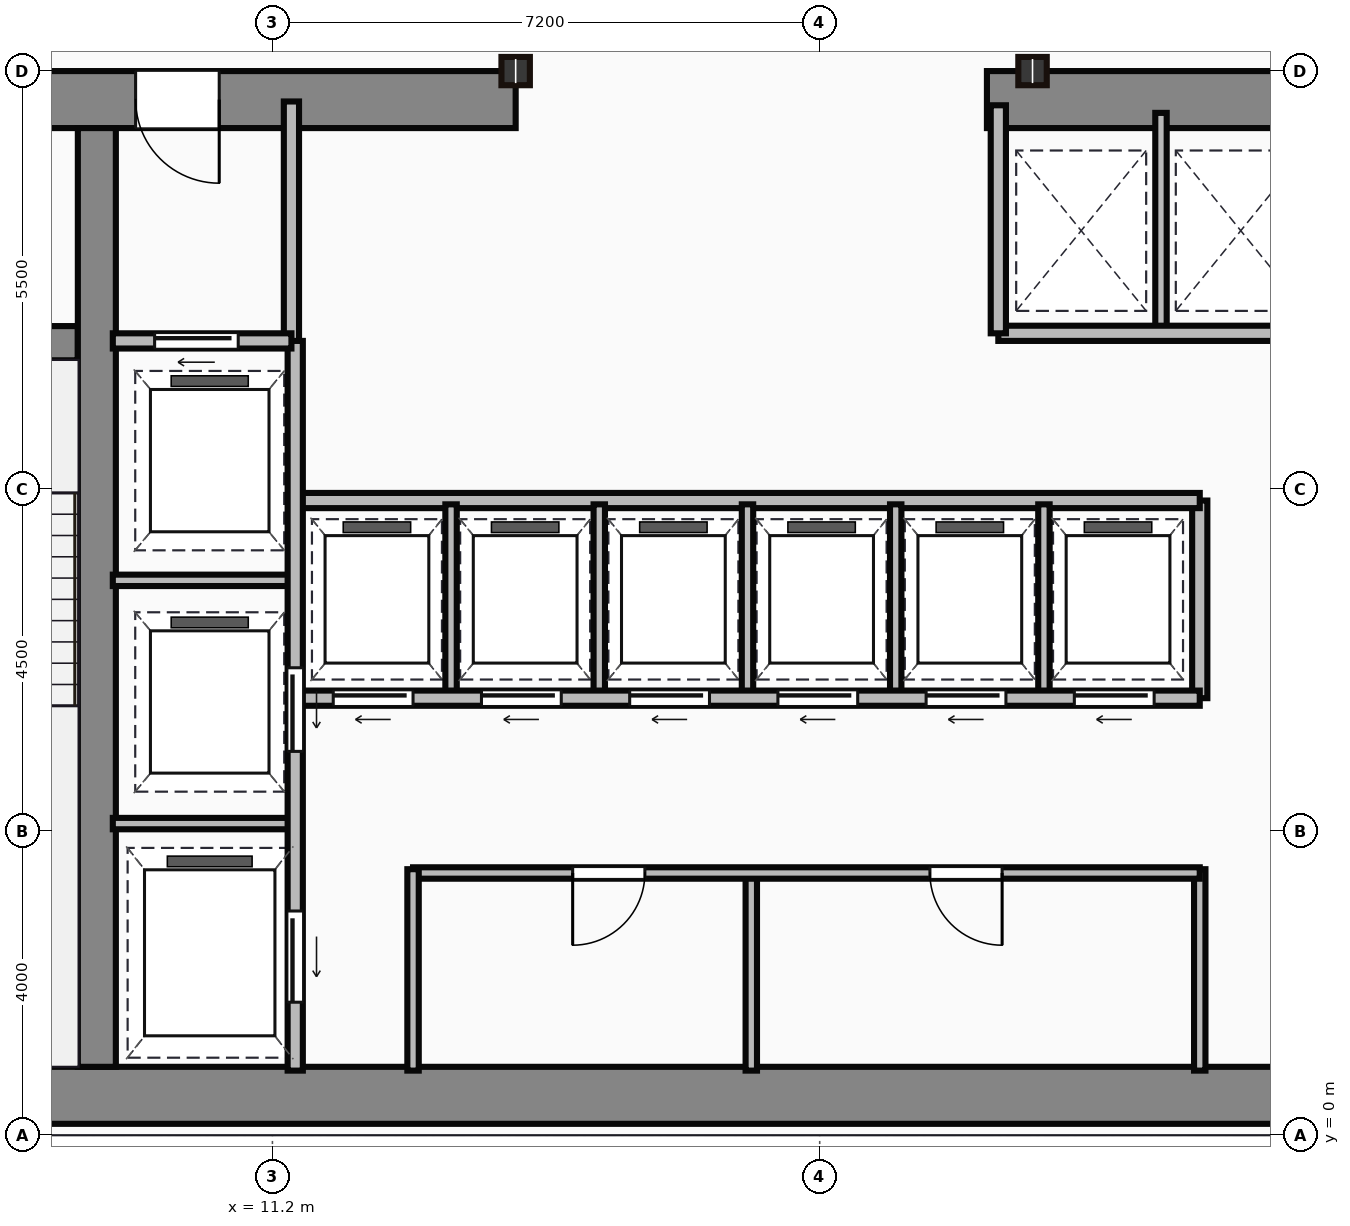
"""IFC4 building model, lengths in metres.
Left out: names, types, materials, properties, quantities, classifications, styles, units other than length and angle.
Written with IfcOpenShell. Run it as: python <this file> out.ifc"""

import sys

from ifc_helpers import new_model, si_unit, direction, frame, frame_2d, origin, origin_2d, place, context, subcontext, project, spatial, rectangle, i_section, extrude, source, transform, mapped, element, fill, save


model = new_model("IFC4")
c1 = context("Model", 3, precision=1e-05, world=origin(), true_north=direction((0.0, 1.0)))
c2 = subcontext(c1, "Body", "Model", "MODEL_VIEW")
j1 = project(units=[si_unit("LENGTHUNIT", "METRE"), si_unit("PLANEANGLEUNIT", "RADIAN")], contexts=[c1])
p1 = place(None, origin())
s1 = spatial("IfcSite", under=j1, at=p1, CompositionType="ELEMENT")
p2 = place(p1, origin())
s2 = spatial("IfcBuilding", under=s1, at=p2, CompositionType="ELEMENT")
p3 = place(p2, frame((0.0, 0.0, 173.45)))
s3 = spatial("IfcBuildingStorey", under=s2, at=p3, CompositionType="ELEMENT", Elevation=173.45)
m1 = source(origin(), c2, "Body", "SweptSolid", [
    extrude(rectangle(XDim=29.5, YDim=0.75, at=frame_2d((14.75, 0.0))), origin(), (0.0, 0.0, 1.0), 3.65),
])
p4 = place(p3, frame((4.5, 0.525, 0.0), z_axis=(0.0, 0.0, 1.0), x_axis=(1.0, 0.0, 0.0)))
e1 = element("IfcWall", 1, at=p4, inside=s3, PredefinedType="SHEAR", context=c2, shape_type="MappedRepresentation", body=[
    mapped(m1, transform((0.0, 0.0, 0.0))),
])
m2 = source(origin(), c2, "Body", "SweptSolid", [
    extrude(rectangle(XDim=9.1, YDim=0.75, at=frame_2d((4.55, 0.0))), origin(), (0.0, 0.0, 1.0), 3.65),
])
p5 = place(p3, frame((5.3, 13.625, 0.0), z_axis=(0.0, 0.0, 1.0), x_axis=(1.0, 0.0, 0.0)))
e2 = element("IfcWall", 2, at=p5, inside=s3, PredefinedType="SHEAR", context=c2, shape_type="MappedRepresentation", body=[
    mapped(m2, transform((0.0, 0.0, 0.0))),
])
p6 = place(p5, frame((4.1, 0.0, 0.0)))
e3 = element("IfcOpeningElement", 3, at=p6, cuts=e2, PredefinedType="OPENING", context=c2, shape_type="SweptSolid", body=[
    extrude(rectangle(XDim=1.1, YDim=2.15, at=frame_2d((0.55, 1.075))), frame((0.0, 0.385, 0.0), z_axis=(0.0, -1.0, 0.0), x_axis=(1.0, 0.0, 0.0)), (0.0, 0.0, 1.0), 0.77),
])
m3 = source(origin(), c2, "Body", "SweptSolid", [
    extrude(rectangle(XDim=12.6, YDim=0.75, at=frame_2d((6.3, 0.0))), origin(), (0.0, 0.0, 1.0), 3.65),
])
p7 = place(p3, frame((20.6, 13.625, 0.0), z_axis=(0.0, 0.0, 1.0), x_axis=(1.0, 0.0, 0.0)))
e4 = element("IfcWall", 4, at=p7, inside=s3, PredefinedType="SHEAR", context=c2, shape_type="MappedRepresentation", body=[
    mapped(m3, transform((0.0, 0.0, 0.0))),
])
p8 = place(p7, frame((9.25, 0.0, 0.0)))
e5 = element("IfcOpeningElement", 5, at=p8, cuts=e4, PredefinedType="OPENING", context=c2, shape_type="SweptSolid", body=[
    extrude(rectangle(XDim=1.1, YDim=2.15, at=frame_2d((0.55, 1.075))), frame((0.0, 0.385, 0.0), z_axis=(0.0, -1.0, 0.0), x_axis=(1.0, 0.0, 0.0)), (0.0, 0.0, 1.0), 0.77),
])
m4 = source(origin(), c2, "Body", "SweptSolid", [
    extrude(rectangle(XDim=12.35, YDim=0.5, at=frame_2d((6.175, 0.0))), origin(), (0.0, 0.0, 1.0), 3.65),
])
p9 = place(p3, frame((8.89, 0.9, 0.0), z_axis=(0.0, 0.0, 1.0), x_axis=(0.0, 1.0, 0.0)))
e6 = element("IfcWall", 6, at=p9, inside=s3, PredefinedType="SHEAR", context=c2, shape_type="MappedRepresentation", body=[
    mapped(m4, transform((0.0, 0.0, 0.0))),
])
m5 = source(origin(), c2, "Body", "SweptSolid", [
    extrude(rectangle(XDim=3.39, YDim=0.45, at=frame_2d((1.695, 0.0))), origin(), (0.0, 0.0, 1.0), 3.65),
])
p10 = place(p3, frame((5.25, 10.42, 0.0), z_axis=(0.0, 0.0, 1.0), x_axis=(1.0, 0.0, 0.0)))
e7 = element("IfcWall", 7, at=p10, inside=s3, PredefinedType="SHEAR", context=c2, shape_type="MappedRepresentation", body=[
    mapped(m5, transform((0.0, 0.0, 0.0))),
])
p11 = place(p10, frame((1.05, 0.0, 0.0)))
e8 = element("IfcOpeningElement", 8, at=p11, cuts=e7, PredefinedType="OPENING", context=c2, shape_type="SweptSolid", body=[
    extrude(rectangle(XDim=1.1, YDim=2.15, at=frame_2d((0.55, 1.075))), frame((0.0, 0.235, 0.0), z_axis=(0.0, -1.0, 0.0), x_axis=(1.0, 0.0, 0.0)), (0.0, 0.0, 1.0), 0.47),
])
m6 = source(origin(), c2, "Body", "SweptSolid", [
    extrude(i_section(OverallWidth=0.374, OverallDepth=0.372, WebThickness=0.016, FlangeThickness=0.026, at=origin_2d()), origin(), (0.0, 0.0, 1.0), 3.65),
])
for number, where, z_axis, x_axis in (
    (9, (14.4, 14.0, 0.0), (0.0, 0.0, 1.0), (1.0, 0.0, 0.0)),
    (10, (21.2, 14.0, 0.0), (0.0, 0.0, 1.0), (1.0, 0.0, 0.0)),
):
    element("IfcColumn", number, at=place(p3, frame(where, z_axis=z_axis, x_axis=x_axis)), inside=s3, PredefinedType="COLUMN", context=c2, shape_type="MappedRepresentation", body=[
        mapped(m6, transform((0.0, 0.0, 0.0))),
    ])
m7 = source(origin(), c2, "Body", "SweptSolid", [
    extrude(rectangle(XDim=3.18, YDim=0.2, at=frame_2d((1.59, 0.0))), origin(), (0.0, 0.0, 1.0), 3.4),
])
p12 = place(p3, frame((11.45, 10.42, 0.0), z_axis=(0.0, 0.0, 1.0), x_axis=(0.0, 1.0, 0.0)))
e11 = element("IfcWall", 11, at=p12, inside=s3, PredefinedType="PARTITIONING", context=c2, shape_type="MappedRepresentation", body=[
    mapped(m7, transform((0.0, 0.0, 0.0))),
])
m8 = source(origin(), c2, "Body", "SweptSolid", [
    extrude(rectangle(XDim=2.35, YDim=0.2, at=frame_2d((1.175, 0.0))), origin(), (0.0, 0.0, 1.0), 3.4),
])
p13 = place(p3, frame((9.1, 10.45, 0.0), z_axis=(0.0, 0.0, 1.0), x_axis=(1.0, 0.0, 0.0)))
e12 = element("IfcWall", 12, at=p13, inside=s3, PredefinedType="PARTITIONING", context=c2, shape_type="MappedRepresentation", body=[
    mapped(m8, transform((0.0, 0.0, 0.0))),
])
p14 = place(p13, frame((0.55, 0.0, 0.0)))
e13 = element("IfcOpeningElement", 13, at=p14, cuts=e12, PredefinedType="OPENING", context=c2, shape_type="SweptSolid", body=[
    extrude(rectangle(XDim=1.1, YDim=2.15, at=frame_2d((0.55, 1.075))), frame((0.0, 0.11, 0.0), z_axis=(0.0, -1.0, 0.0), x_axis=(1.0, 0.0, 0.0)), (0.0, 0.0, 1.0), 0.22),
])
m9 = source(origin(), c2, "Body", "SweptSolid", [
    extrude(rectangle(XDim=9.6, YDim=0.2, at=frame_2d((4.8, 0.0))), origin(), (0.0, 0.0, 1.0), 3.4),
])
p15 = place(p3, frame((11.5, 0.85, 0.0), z_axis=(0.0, 0.0, 1.0), x_axis=(0.0, 1.0, 0.0)))
e14 = element("IfcWall", 14, at=p15, inside=s3, PredefinedType="PARTITIONING", context=c2, shape_type="MappedRepresentation", body=[
    mapped(m9, transform((0.0, 0.0, 0.0))),
])
p16 = place(p15, frame((4.2, 0.0, 0.0)))
e15 = element("IfcOpeningElement", 15, at=p16, cuts=e14, PredefinedType="OPENING", context=c2, shape_type="SweptSolid", body=[
    extrude(rectangle(XDim=1.1, YDim=2.15, at=frame_2d((0.55, 1.075))), frame((0.0, 0.11, 0.0), z_axis=(0.0, -1.0, 0.0), x_axis=(1.0, 0.0, 0.0)), (0.0, 0.0, 1.0), 0.22),
])
p17 = place(p15, frame((0.9, 0.0, 0.0)))
e16 = element("IfcOpeningElement", 16, at=p17, cuts=e14, PredefinedType="OPENING", context=c2, shape_type="SweptSolid", body=[
    extrude(rectangle(XDim=1.2, YDim=2.15, at=frame_2d((0.6, 1.075))), frame((0.0, 0.11, 0.0), z_axis=(0.0, -1.0, 0.0), x_axis=(1.0, 0.0, 0.0)), (0.0, 0.0, 1.0), 0.22),
])
m10 = source(origin(), c2, "Body", "SweptSolid", [
    extrude(rectangle(XDim=2.4, YDim=0.15, at=frame_2d((1.2, 0.0))), origin(), (0.0, 0.0, 1.0), 3.4),
])
for number, where, z_axis, x_axis in (
    (17, (9.1, 4.1, 0.0), (0.0, 0.0, 1.0), (1.0, 0.0, 0.0)),
    (18, (9.1, 7.3, 0.0), (0.0, 0.0, 1.0), (1.0, 0.0, 0.0)),
):
    element("IfcWall", number, at=place(p3, frame(where, z_axis=z_axis, x_axis=x_axis)), inside=s3, PredefinedType="PARTITIONING", context=c2, shape_type="MappedRepresentation", body=[
        mapped(m10, transform((0.0, 0.0, 0.0))),
    ])
m11 = source(origin(), c2, "Body", "SweptSolid", [
    extrude(rectangle(XDim=2.65, YDim=0.15, at=frame_2d((1.325, 0.0))), origin(), (0.0, 0.0, 1.0), 3.4),
])
p18 = place(p3, frame((13.05, 0.85, 0.0), z_axis=(0.0, 0.0, 1.0), x_axis=(0.0, 1.0, 0.0)))
e19 = element("IfcWall", 19, at=p18, inside=s3, PredefinedType="PARTITIONING", context=c2, shape_type="MappedRepresentation", body=[
    mapped(m11, transform((0.0, 0.0, 0.0))),
])
m12 = source(origin(), c2, "Body", "SweptSolid", [
    extrude(rectangle(XDim=10.35, YDim=0.15, at=frame_2d((5.175, 0.0))), origin(), (0.0, 0.0, 1.0), 3.4),
])
p19 = place(p3, frame((13.05, 3.45, 0.0), z_axis=(0.0, 0.0, 1.0), x_axis=(1.0, 0.0, 0.0)))
e20 = element("IfcWall", 20, at=p19, inside=s3, PredefinedType="PARTITIONING", context=c2, shape_type="MappedRepresentation", body=[
    mapped(m12, transform((0.0, 0.0, 0.0))),
])
p20 = place(p19, frame((2.1, 0.0, 0.0)))
e21 = element("IfcOpeningElement", 21, at=p20, cuts=e20, PredefinedType="OPENING", context=c2, shape_type="SweptSolid", body=[
    extrude(rectangle(XDim=0.95, YDim=2.15, at=frame_2d((0.475, 1.075))), frame((0.0, 0.085, 0.0), z_axis=(0.0, -1.0, 0.0), x_axis=(1.0, 0.0, 0.0)), (0.0, 0.0, 1.0), 0.17),
])
p21 = place(p19, frame((6.8, 0.0, 0.0)))
e22 = element("IfcOpeningElement", 22, at=p21, cuts=e20, PredefinedType="OPENING", context=c2, shape_type="SweptSolid", body=[
    extrude(rectangle(XDim=0.95, YDim=2.15, at=frame_2d((0.475, 1.075))), frame((0.0, 0.085, 0.0), z_axis=(0.0, -1.0, 0.0), x_axis=(1.0, 0.0, 0.0)), (0.0, 0.0, 1.0), 0.17),
])
p22 = place(p3, frame((23.4, 0.85, 0.0), z_axis=(0.0, 0.0, 1.0), x_axis=(0.0, 1.0, 0.0)))
e23 = element("IfcWall", 23, at=p22, inside=s3, PredefinedType="PARTITIONING", context=c2, shape_type="MappedRepresentation", body=[
    mapped(m11, transform((0.0, 0.0, 0.0))),
])
m13 = source(origin(), c2, "Body", "SweptSolid", [
    extrude(rectangle(XDim=2.6, YDim=0.15, at=frame_2d((1.3, 0.0))), origin(), (0.0, 0.0, 1.0), 3.4),
])
p23 = place(p3, frame((17.5, 0.85, 0.0), z_axis=(0.0, 0.0, 1.0), x_axis=(0.0, 1.0, 0.0)))
e24 = element("IfcWall", 24, at=p23, inside=s3, PredefinedType="PARTITIONING", context=c2, shape_type="MappedRepresentation", body=[
    mapped(m13, transform((0.0, 0.0, 0.0))),
])
m14 = source(origin(), c2, "Body", "SweptSolid", [
    extrude(rectangle(XDim=11.85, YDim=0.2, at=frame_2d((5.925, 0.0))), origin(), (0.0, 0.0, 1.0), 3.4),
])
p24 = place(p3, frame((11.55, 5.75, 0.0), z_axis=(0.0, 0.0, 1.0), x_axis=(1.0, 0.0, 0.0)))
e25 = element("IfcWall", 25, at=p24, inside=s3, PredefinedType="PARTITIONING", context=c2, shape_type="MappedRepresentation", body=[
    mapped(m14, transform((0.0, 0.0, 0.0))),
])
p25 = place(p24, frame((0.45, 0.0, 0.0)))
e26 = element("IfcOpeningElement", 26, at=p25, cuts=e25, PredefinedType="OPENING", context=c2, shape_type="SweptSolid", body=[
    extrude(rectangle(XDim=1.05, YDim=2.15, at=frame_2d((0.525, 1.075))), frame((0.0, 0.11, 0.0), z_axis=(0.0, -1.0, 0.0), x_axis=(1.0, 0.0, 0.0)), (0.0, 0.0, 1.0), 0.22),
])
p26 = place(p24, frame((2.4, 0.0, 0.0)))
e27 = element("IfcOpeningElement", 27, at=p26, cuts=e25, PredefinedType="OPENING", context=c2, shape_type="SweptSolid", body=[
    extrude(rectangle(XDim=1.05, YDim=2.15, at=frame_2d((0.525, 1.075))), frame((0.0, 0.11, 0.0), z_axis=(0.0, -1.0, 0.0), x_axis=(1.0, 0.0, 0.0)), (0.0, 0.0, 1.0), 0.22),
])
p27 = place(p24, frame((4.35, 0.0, 0.0)))
e28 = element("IfcOpeningElement", 28, at=p27, cuts=e25, PredefinedType="OPENING", context=c2, shape_type="SweptSolid", body=[
    extrude(rectangle(XDim=1.05, YDim=2.15, at=frame_2d((0.525, 1.075))), frame((0.0, 0.11, 0.0), z_axis=(0.0, -1.0, 0.0), x_axis=(1.0, 0.0, 0.0)), (0.0, 0.0, 1.0), 0.22),
])
p28 = place(p24, frame((6.3, 0.0, 0.0)))
e29 = element("IfcOpeningElement", 29, at=p28, cuts=e25, PredefinedType="OPENING", context=c2, shape_type="SweptSolid", body=[
    extrude(rectangle(XDim=1.05, YDim=2.15, at=frame_2d((0.525, 1.075))), frame((0.0, 0.11, 0.0), z_axis=(0.0, -1.0, 0.0), x_axis=(1.0, 0.0, 0.0)), (0.0, 0.0, 1.0), 0.22),
])
p29 = place(p24, frame((8.25, 0.0, 0.0)))
e30 = element("IfcOpeningElement", 30, at=p29, cuts=e25, PredefinedType="OPENING", context=c2, shape_type="SweptSolid", body=[
    extrude(rectangle(XDim=1.05, YDim=2.15, at=frame_2d((0.525, 1.075))), frame((0.0, 0.11, 0.0), z_axis=(0.0, -1.0, 0.0), x_axis=(1.0, 0.0, 0.0)), (0.0, 0.0, 1.0), 0.22),
])
p30 = place(p24, frame((10.2, 0.0, 0.0)))
e31 = element("IfcOpeningElement", 31, at=p30, cuts=e25, PredefinedType="OPENING", context=c2, shape_type="SweptSolid", body=[
    extrude(rectangle(XDim=1.05, YDim=2.15, at=frame_2d((0.525, 1.075))), frame((0.0, 0.11, 0.0), z_axis=(0.0, -1.0, 0.0), x_axis=(1.0, 0.0, 0.0)), (0.0, 0.0, 1.0), 0.22),
])
p31 = place(p3, frame((11.55, 8.35, 0.0), z_axis=(0.0, 0.0, 1.0), x_axis=(1.0, 0.0, 0.0)))
e32 = element("IfcWall", 32, at=p31, inside=s3, PredefinedType="PARTITIONING", context=c2, shape_type="MappedRepresentation", body=[
    mapped(m14, transform((0.0, 0.0, 0.0))),
])
m15 = source(origin(), c2, "Body", "SweptSolid", [
    extrude(rectangle(XDim=2.6, YDim=0.2, at=frame_2d((1.3, 0.0))), origin(), (0.0, 0.0, 1.0), 3.4),
])
p32 = place(p3, frame((23.4, 5.75, 0.0), z_axis=(0.0, 0.0, 1.0), x_axis=(0.0, 1.0, 0.0)))
e33 = element("IfcWall", 33, at=p32, inside=s3, PredefinedType="PARTITIONING", context=c2, shape_type="MappedRepresentation", body=[
    mapped(m15, transform((0.0, 0.0, 0.0))),
])
m16 = source(origin(), c2, "Body", "SweptSolid", [
    extrude(rectangle(XDim=2.5, YDim=0.15, at=frame_2d((1.25, 0.0))), origin(), (0.0, 0.0, 1.0), 3.4),
])
for number, where, z_axis, x_axis in (
    (34, (13.55, 5.8, 0.0), (0.0, 0.0, 1.0), (0.0, 1.0, 0.0)),
    (35, (15.5, 5.8, 0.0), (0.0, 0.0, 1.0), (0.0, 1.0, 0.0)),
    (36, (17.45, 5.8, 0.0), (0.0, 0.0, 1.0), (0.0, 1.0, 0.0)),
    (37, (19.4, 5.8, 0.0), (0.0, 0.0, 1.0), (0.0, 1.0, 0.0)),
    (38, (21.35, 5.8, 0.0), (0.0, 0.0, 1.0), (0.0, 1.0, 0.0)),
):
    element("IfcWall", number, at=place(p3, frame(where, z_axis=z_axis, x_axis=x_axis)), inside=s3, PredefinedType="PARTITIONING", context=c2, shape_type="MappedRepresentation", body=[
        mapped(m16, transform((0.0, 0.0, 0.0))),
    ])
m17 = source(origin(), c2, "Body", "SweptSolid", [
    extrude(rectangle(XDim=8.8, YDim=0.2, at=frame_2d((4.4, 0.0))), origin(), (0.0, 0.0, 1.0), 3.4),
])
p33 = place(p3, frame((20.75, 10.55, 0.0), z_axis=(0.0, 0.0, 1.0), x_axis=(1.0, 0.0, 0.0)))
e39 = element("IfcWall", 39, at=p33, inside=s3, PredefinedType="PARTITIONING", context=c2, shape_type="MappedRepresentation", body=[
    mapped(m17, transform((0.0, 0.0, 0.0))),
])
m18 = source(origin(), c2, "Body", "SweptSolid", [
    extrude(rectangle(XDim=3.0, YDim=0.2, at=frame_2d((1.5, 0.0))), origin(), (0.0, 0.0, 1.0), 3.4),
])
p34 = place(p3, frame((20.75, 10.55, 0.0), z_axis=(0.0, 0.0, 1.0), x_axis=(0.0, 1.0, 0.0)))
e40 = element("IfcWall", 40, at=p34, inside=s3, PredefinedType="PARTITIONING", context=c2, shape_type="MappedRepresentation", body=[
    mapped(m18, transform((0.0, 0.0, 0.0))),
])
m19 = source(origin(), c2, "Body", "SweptSolid", [
    extrude(rectangle(XDim=2.85, YDim=0.15, at=frame_2d((1.425, 0.0))), origin(), (0.0, 0.0, 1.0), 3.4),
])
p35 = place(p3, frame((22.89, 10.6, 0.0), z_axis=(0.0, 0.0, 1.0), x_axis=(0.0, 1.0, 0.0)))
e41 = element("IfcWall", 41, at=p35, inside=s3, PredefinedType="PARTITIONING", context=c2, shape_type="MappedRepresentation", body=[
    mapped(m19, transform((0.0, 0.0, 0.0))),
])
m20 = source(origin(), c2, "Body", "SweptSolid", [
    extrude(rectangle(XDim=1.1, YDim=2.15, at=frame_2d((0.55, 1.075))), frame((0.0, 0.025, 0.0), z_axis=(0.0, -1.0, 0.0), x_axis=(1.0, 0.0, 0.0)), (0.0, 0.0, 1.0), 0.05),
])
p36 = place(p6, origin())
e42 = element("IfcDoor", 42, at=p36, inside=s3, OperationType="SINGLE_SWING_RIGHT", PredefinedType="DOOR", context=c2, shape_type="MappedRepresentation", body=[
    mapped(m20, transform((0.0, 0.0, 0.0))),
])
fill(e3, e42)
p37 = place(p14, origin())
e43 = element("IfcDoor", 43, at=p37, inside=s3, OperationType="SLIDING_TO_LEFT", PredefinedType="DOOR", context=c2, shape_type="MappedRepresentation", body=[
    mapped(m20, transform((0.0, 0.0, 0.0))),
])
fill(e13, e43)
p38 = place(p16, frame((1.1, 0.0, 0.0), z_axis=(0.0, 0.0, 1.0), x_axis=(-1.0, 0.0, 0.0)))
e44 = element("IfcDoor", 44, at=p38, inside=s3, OperationType="SLIDING_TO_LEFT", PredefinedType="DOOR", context=c2, shape_type="MappedRepresentation", body=[
    mapped(m20, transform((0.0, 0.0, 0.0))),
])
fill(e15, e44)
m21 = source(origin(), c2, "Body", "SweptSolid", [
    extrude(rectangle(XDim=1.2, YDim=2.15, at=frame_2d((0.6, 1.075))), frame((0.0, 0.025, 0.0), z_axis=(0.0, -1.0, 0.0), x_axis=(1.0, 0.0, 0.0)), (0.0, 0.0, 1.0), 0.05),
])
p39 = place(p17, frame((1.2, 0.0, 0.0), z_axis=(0.0, 0.0, 1.0), x_axis=(-1.0, 0.0, 0.0)))
e45 = element("IfcDoor", 45, at=p39, inside=s3, OperationType="SLIDING_TO_LEFT", PredefinedType="DOOR", context=c2, shape_type="MappedRepresentation", body=[
    mapped(m21, transform((0.0, 0.0, 0.0))),
])
fill(e16, e45)
m22 = source(origin(), c2, "Body", "SweptSolid", [
    extrude(rectangle(XDim=0.95, YDim=2.15, at=frame_2d((0.475, 1.075))), frame((0.0, 0.025, 0.0), z_axis=(0.0, -1.0, 0.0), x_axis=(1.0, 0.0, 0.0)), (0.0, 0.0, 1.0), 0.05),
])
p40 = place(p20, origin())
e46 = element("IfcDoor", 46, at=p40, inside=s3, OperationType="SINGLE_SWING_LEFT", PredefinedType="DOOR", context=c2, shape_type="MappedRepresentation", body=[
    mapped(m22, transform((0.0, 0.0, 0.0))),
])
fill(e21, e46)
p41 = place(p21, origin())
e47 = element("IfcDoor", 47, at=p41, inside=s3, OperationType="SINGLE_SWING_RIGHT", PredefinedType="DOOR", context=c2, shape_type="MappedRepresentation", body=[
    mapped(m22, transform((0.0, 0.0, 0.0))),
])
fill(e22, e47)
m23 = source(origin(), c2, "Body", "SweptSolid", [
    extrude(rectangle(XDim=1.05, YDim=2.15, at=frame_2d((0.525, 1.075))), frame((0.0, 0.025, 0.0), z_axis=(0.0, -1.0, 0.0), x_axis=(1.0, 0.0, 0.0)), (0.0, 0.0, 1.0), 0.05),
])
p42 = place(p25, frame((1.05, 0.0, 0.0), z_axis=(0.0, 0.0, 1.0), x_axis=(-1.0, 0.0, 0.0)))
e48 = element("IfcDoor", 48, at=p42, inside=s3, OperationType="SLIDING_TO_LEFT", PredefinedType="DOOR", context=c2, shape_type="MappedRepresentation", body=[
    mapped(m23, transform((0.0, 0.0, 0.0))),
])
fill(e26, e48)
p43 = place(p26, frame((1.05, 0.0, 0.0), z_axis=(0.0, 0.0, 1.0), x_axis=(-1.0, 0.0, 0.0)))
e49 = element("IfcDoor", 49, at=p43, inside=s3, OperationType="SLIDING_TO_LEFT", PredefinedType="DOOR", context=c2, shape_type="MappedRepresentation", body=[
    mapped(m23, transform((0.0, 0.0, 0.0))),
])
fill(e27, e49)
p44 = place(p27, frame((1.05, 0.0, 0.0), z_axis=(0.0, 0.0, 1.0), x_axis=(-1.0, 0.0, 0.0)))
e50 = element("IfcDoor", 50, at=p44, inside=s3, OperationType="SLIDING_TO_LEFT", PredefinedType="DOOR", context=c2, shape_type="MappedRepresentation", body=[
    mapped(m23, transform((0.0, 0.0, 0.0))),
])
fill(e28, e50)
p45 = place(p28, frame((1.05, 0.0, 0.0), z_axis=(0.0, 0.0, 1.0), x_axis=(-1.0, 0.0, 0.0)))
e51 = element("IfcDoor", 51, at=p45, inside=s3, OperationType="SLIDING_TO_LEFT", PredefinedType="DOOR", context=c2, shape_type="MappedRepresentation", body=[
    mapped(m23, transform((0.0, 0.0, 0.0))),
])
fill(e29, e51)
p46 = place(p29, frame((1.05, 0.0, 0.0), z_axis=(0.0, 0.0, 1.0), x_axis=(-1.0, 0.0, 0.0)))
e52 = element("IfcDoor", 52, at=p46, inside=s3, OperationType="SLIDING_TO_LEFT", PredefinedType="DOOR", context=c2, shape_type="MappedRepresentation", body=[
    mapped(m23, transform((0.0, 0.0, 0.0))),
])
fill(e30, e52)
p47 = place(p30, frame((1.05, 0.0, 0.0), z_axis=(0.0, 0.0, 1.0), x_axis=(-1.0, 0.0, 0.0)))
e53 = element("IfcDoor", 53, at=p47, inside=s3, OperationType="SLIDING_TO_LEFT", PredefinedType="DOOR", context=c2, shape_type="MappedRepresentation", body=[
    mapped(m23, transform((0.0, 0.0, 0.0))),
])
fill(e31, e53)
save(model, sys.argv[1])
